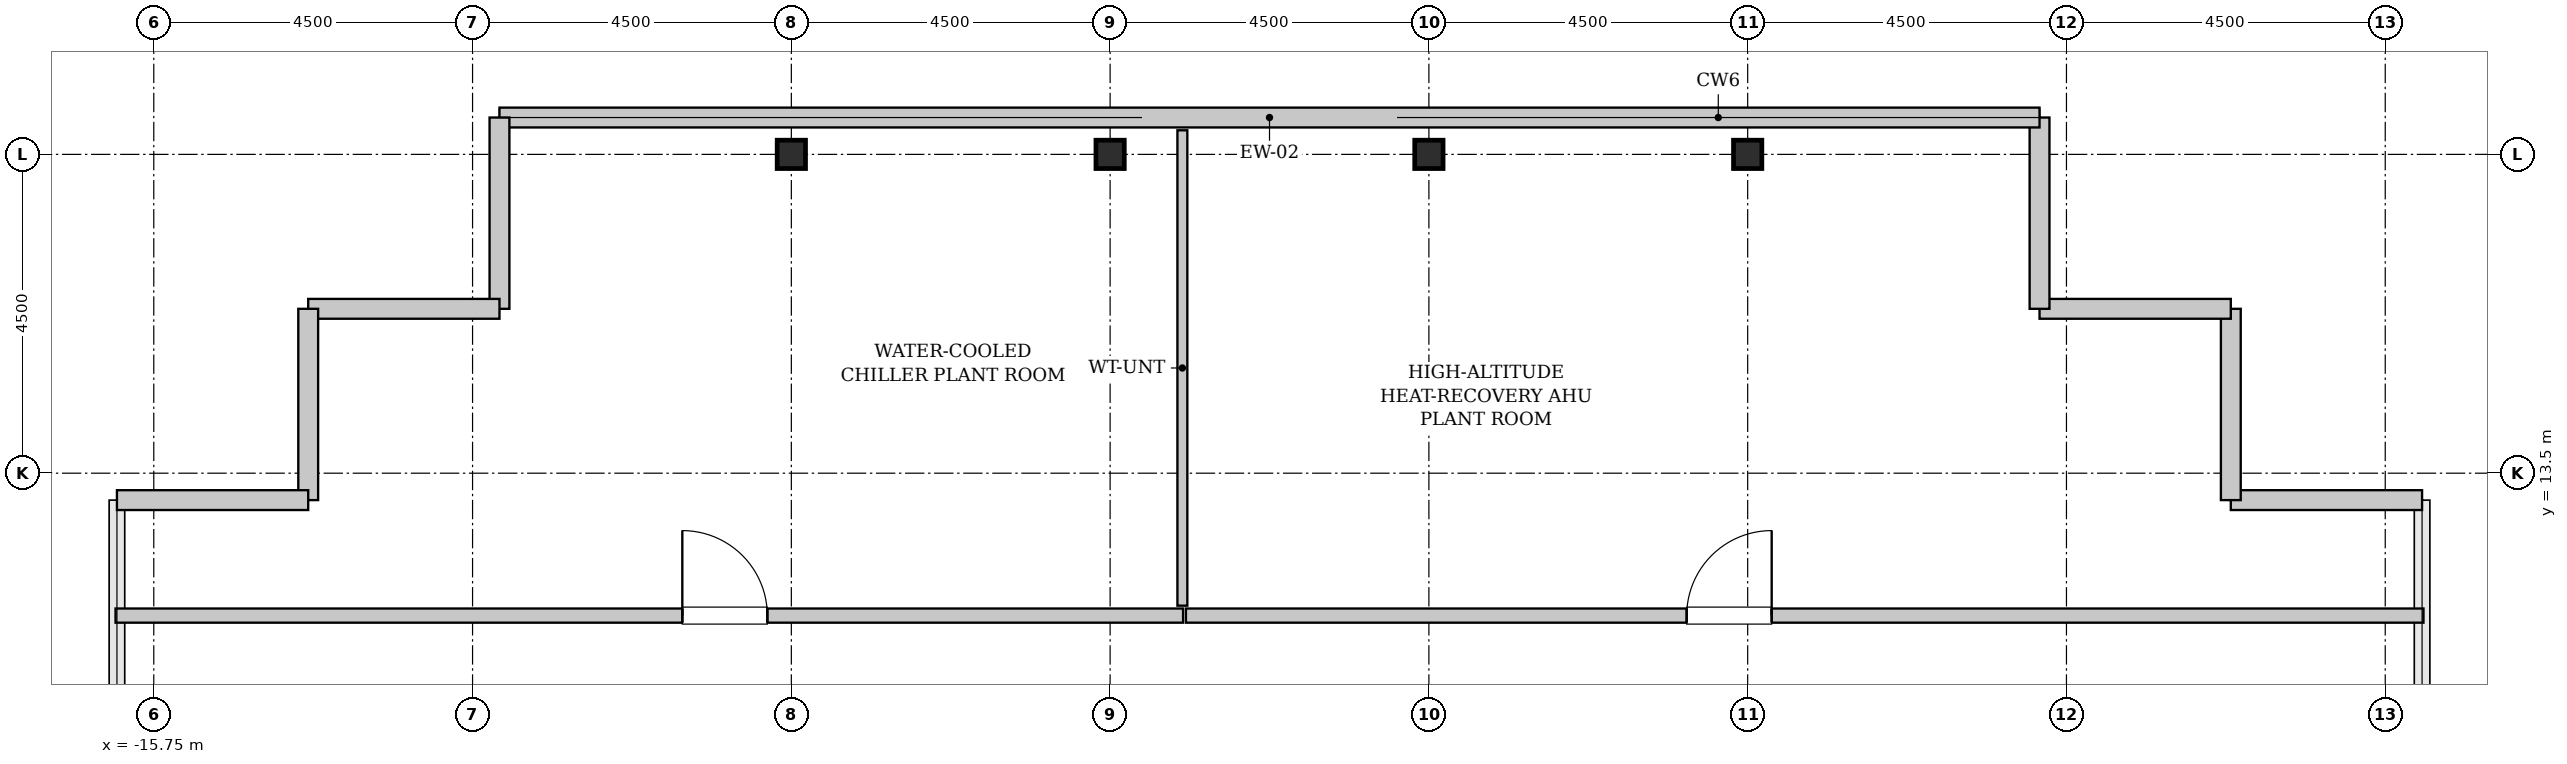
"""IFC4 building model, lengths in metres.
Left out: names, types, materials, properties, quantities, classifications, styles, units other than length and angle.
Written with IfcOpenShell. Run it as: python <this file> out.ifc"""

import sys

from ifc_helpers import new_model, si_unit, direction, frame, frame_2d, origin, origin_2d, place, context, subcontext, project, spatial, rectangle, hollow_rectangle, extrude, source, transform, mapped, element, fill, save


model = new_model("IFC4")
c1 = context("Model", 3, precision=1e-05, world=origin(), true_north=direction((0.0, 1.0)))
c2 = subcontext(c1, "Body", "Model", "MODEL_VIEW")
j1 = project(units=[si_unit("LENGTHUNIT", "METRE"), si_unit("PLANEANGLEUNIT", "RADIAN")], contexts=[c1])
p1 = place(None, origin())
s1 = spatial("IfcSite", under=j1, at=p1, CompositionType="ELEMENT")
p2 = place(p1, origin())
s2 = spatial("IfcBuilding", under=s1, at=p2, CompositionType="ELEMENT")
p3 = place(p2, frame((0.0, 0.0, 363.0)))
s3 = spatial("IfcBuildingStorey", under=s2, at=p3, CompositionType="ELEMENT", Elevation=363.0)
m1 = source(origin(), c2, "Body", "SweptSolid", [
    extrude(hollow_rectangle(XDim=0.4, YDim=0.4, WallThickness=0.02, InnerFilletRadius=0.02, OuterFilletRadius=0.04, at=origin_2d()), origin(), (0.0, 0.0, 1.0), 4.4),
])
for number, where, z_axis, x_axis in (
    (1, (-6.75, 18.0, 0.0), (0.0, 0.0, 1.0), (1.0, 0.0, 0.0)),
    (2, (-2.25, 18.0, 0.0), (0.0, 0.0, 1.0), (1.0, 0.0, 0.0)),
    (3, (2.25, 18.0, 0.0), (0.0, 0.0, 1.0), (1.0, 0.0, 0.0)),
    (4, (6.75, 18.0, 0.0), (0.0, 0.0, 1.0), (1.0, 0.0, 0.0)),
):
    element("IfcColumn", number, at=place(p3, frame(where, z_axis=z_axis, x_axis=x_axis)), inside=s3, PredefinedType="COLUMN", context=c2, shape_type="MappedRepresentation", body=[
        mapped(m1, transform((0.0, 0.0, 0.0), x_axis=(1.0, 0.0, 0.0), y_axis=(0.0, 1.0, 0.0), z_axis=(0.0, 0.0, 1.0), scale=1.0)),
    ])
m2 = source(origin(), c2, "Body", "SweptSolid", [
    extrude(rectangle(XDim=2.7, YDim=0.28, at=frame_2d((1.35, 0.0))), origin(), (0.0, 0.0, 1.0), 4.1),
])
for number, where, z_axis, x_axis in (
    (5, (16.27, 13.12, 0.0), (0.0, 0.0, 1.0), (-1.0, 0.0, 0.0)),
    (6, (13.57, 13.12, 0.0), (0.0, 0.0, 1.0), (0.0, 1.0, 0.0)),
    (7, (13.57, 15.82, 0.0), (0.0, 0.0, 1.0), (-1.0, 0.0, 0.0)),
    (8, (10.87, 15.82, 0.0), (0.0, 0.0, 1.0), (0.0, 1.0, 0.0)),
):
    element("IfcWall", number, at=place(p3, frame(where, z_axis=z_axis, x_axis=x_axis)), inside=s3, PredefinedType="SOLIDWALL", context=c2, shape_type="MappedRepresentation", body=[
        mapped(m2, transform((0.0, 0.0, 0.0), x_axis=(1.0, 0.0, 0.0), y_axis=(0.0, 1.0, 0.0), z_axis=(0.0, 0.0, 1.0), scale=1.0)),
    ])
m3 = source(origin(), c2, "Body", "SweptSolid", [
    extrude(rectangle(XDim=21.74, YDim=0.28, at=frame_2d((10.87, 0.0))), origin(), (0.0, 0.0, 1.0), 1.1),
])
p4 = place(p3, frame((10.87, 18.52, 0.0), z_axis=(0.0, 0.0, 1.0), x_axis=(-1.0, 0.0, 0.0)))
e9 = element("IfcWall", 9, at=p4, inside=s3, PredefinedType="SOLIDWALL", context=c2, shape_type="MappedRepresentation", body=[
    mapped(m3, transform((0.0, 0.0, 0.0), x_axis=(1.0, 0.0, 0.0), y_axis=(0.0, 1.0, 0.0), z_axis=(0.0, 0.0, 1.0), scale=1.0)),
])
for number, where, z_axis, x_axis in (
    (10, (-10.87, 18.52, 0.0), (0.0, 0.0, 1.0), (0.0, -1.0, 0.0)),
    (11, (-10.87, 15.82, 0.0), (0.0, 0.0, 1.0), (-1.0, 0.0, 0.0)),
    (12, (-13.57, 15.82, 0.0), (0.0, 0.0, 1.0), (0.0, -1.0, 0.0)),
    (13, (-13.57, 13.12, 0.0), (0.0, 0.0, 1.0), (-1.0, 0.0, 0.0)),
):
    element("IfcWall", number, at=place(p3, frame(where, z_axis=z_axis, x_axis=x_axis)), inside=s3, PredefinedType="SOLIDWALL", context=c2, shape_type="MappedRepresentation", body=[
        mapped(m2, transform((0.0, 0.0, 0.0), x_axis=(1.0, 0.0, 0.0), y_axis=(0.0, 1.0, 0.0), z_axis=(0.0, 0.0, 1.0), scale=1.0)),
    ])
m4 = source(origin(), c2, "Body", "SweptSolid", [
    extrude(rectangle(XDim=15.07, YDim=0.2, at=frame_2d((7.535, 0.0))), origin(), (0.0, 0.0, 1.0), 4.085),
])
p5 = place(p3, frame((-16.29, 11.49, 0.0), z_axis=(0.0, 0.0, 1.0), x_axis=(1.0, 0.0, 0.0)))
e14 = element("IfcWall", 14, at=p5, inside=s3, PredefinedType="SOLIDWALL", context=c2, shape_type="MappedRepresentation", body=[
    mapped(m4, transform((0.0, 0.0, 0.0), x_axis=(1.0, 0.0, 0.0), y_axis=(0.0, 1.0, 0.0), z_axis=(0.0, 0.0, 1.0), scale=1.0)),
])
p6 = place(p5, frame((8.001, 0.0, 0.0)))
e15 = element("IfcOpeningElement", 15, at=p6, cuts=e14, PredefinedType="OPENING", context=c2, shape_type="SweptSolid", body=[
    extrude(rectangle(XDim=1.2, YDim=2.15, at=frame_2d((0.6, 1.075))), frame((0.0, 0.11, 0.0), z_axis=(0.0, -1.0, 0.0), x_axis=(1.0, 0.0, 0.0)), (0.0, 0.0, 1.0), 0.22),
])
m5 = source(origin(), c2, "Body", "SweptSolid", [
    extrude(rectangle(XDim=6.71, YDim=0.14, at=frame_2d((3.355, 0.0))), origin(), (0.0, 0.0, 1.0), 4.085),
])
p7 = place(p3, frame((-1.23, 11.63, 0.0), z_axis=(0.0, 0.0, 1.0), x_axis=(0.0, 1.0, 0.0)))
e16 = element("IfcWall", 16, at=p7, inside=s3, PredefinedType="PARTITIONING", context=c2, shape_type="MappedRepresentation", body=[
    mapped(m5, transform((0.0, 0.0, 0.0), x_axis=(1.0, 0.0, 0.0), y_axis=(0.0, 1.0, 0.0), z_axis=(0.0, 0.0, 1.0), scale=1.0)),
])
m6 = source(origin(), c2, "Body", "SweptSolid", [
    extrude(rectangle(XDim=17.47, YDim=0.2, at=frame_2d((8.735, 0.0))), origin(), (0.0, 0.0, 1.0), 4.085),
])
p8 = place(p3, frame((-1.18, 11.49, 0.0), z_axis=(0.0, 0.0, 1.0), x_axis=(1.0, 0.0, 0.0)))
e17 = element("IfcWall", 17, at=p8, inside=s3, PredefinedType="SOLIDWALL", context=c2, shape_type="MappedRepresentation", body=[
    mapped(m6, transform((0.0, 0.0, 0.0), x_axis=(1.0, 0.0, 0.0), y_axis=(0.0, 1.0, 0.0), z_axis=(0.0, 0.0, 1.0), scale=1.0)),
])
p9 = place(p8, frame((7.069, 0.0, 0.0)))
e18 = element("IfcOpeningElement", 18, at=p9, cuts=e17, PredefinedType="OPENING", context=c2, shape_type="SweptSolid", body=[
    extrude(rectangle(XDim=1.2, YDim=2.15, at=frame_2d((0.6, 1.075))), frame((0.0, 0.11, 0.0), z_axis=(0.0, -1.0, 0.0), x_axis=(1.0, 0.0, 0.0)), (0.0, 0.0, 1.0), 0.22),
])
m7 = source(origin(), c2, "Body", "SweptSolid", [
    extrude(rectangle(XDim=1.2, YDim=2.15, at=frame_2d((0.6, 1.075))), frame((0.0, 0.025, 0.0), z_axis=(0.0, -1.0, 0.0), x_axis=(1.0, 0.0, 0.0)), (0.0, 0.0, 1.0), 0.05),
])
p10 = place(p6, origin())
e19 = element("IfcDoor", 19, at=p10, inside=s3, OperationType="SINGLE_SWING_LEFT", PredefinedType="DOOR", context=c2, shape_type="MappedRepresentation", body=[
    mapped(m7, transform((0.0, 0.0, 0.0), x_axis=(1.0, 0.0, 0.0), y_axis=(0.0, 1.0, 0.0), z_axis=(0.0, 0.0, 1.0), scale=1.0)),
])
fill(e15, e19)
p11 = place(p9, origin())
e20 = element("IfcDoor", 20, at=p11, inside=s3, OperationType="SINGLE_SWING_RIGHT", PredefinedType="DOOR", context=c2, shape_type="MappedRepresentation", body=[
    mapped(m7, transform((0.0, 0.0, 0.0), x_axis=(1.0, 0.0, 0.0), y_axis=(0.0, 1.0, 0.0), z_axis=(0.0, 0.0, 1.0), scale=1.0)),
])
fill(e18, e20)
save(model, sys.argv[1])
